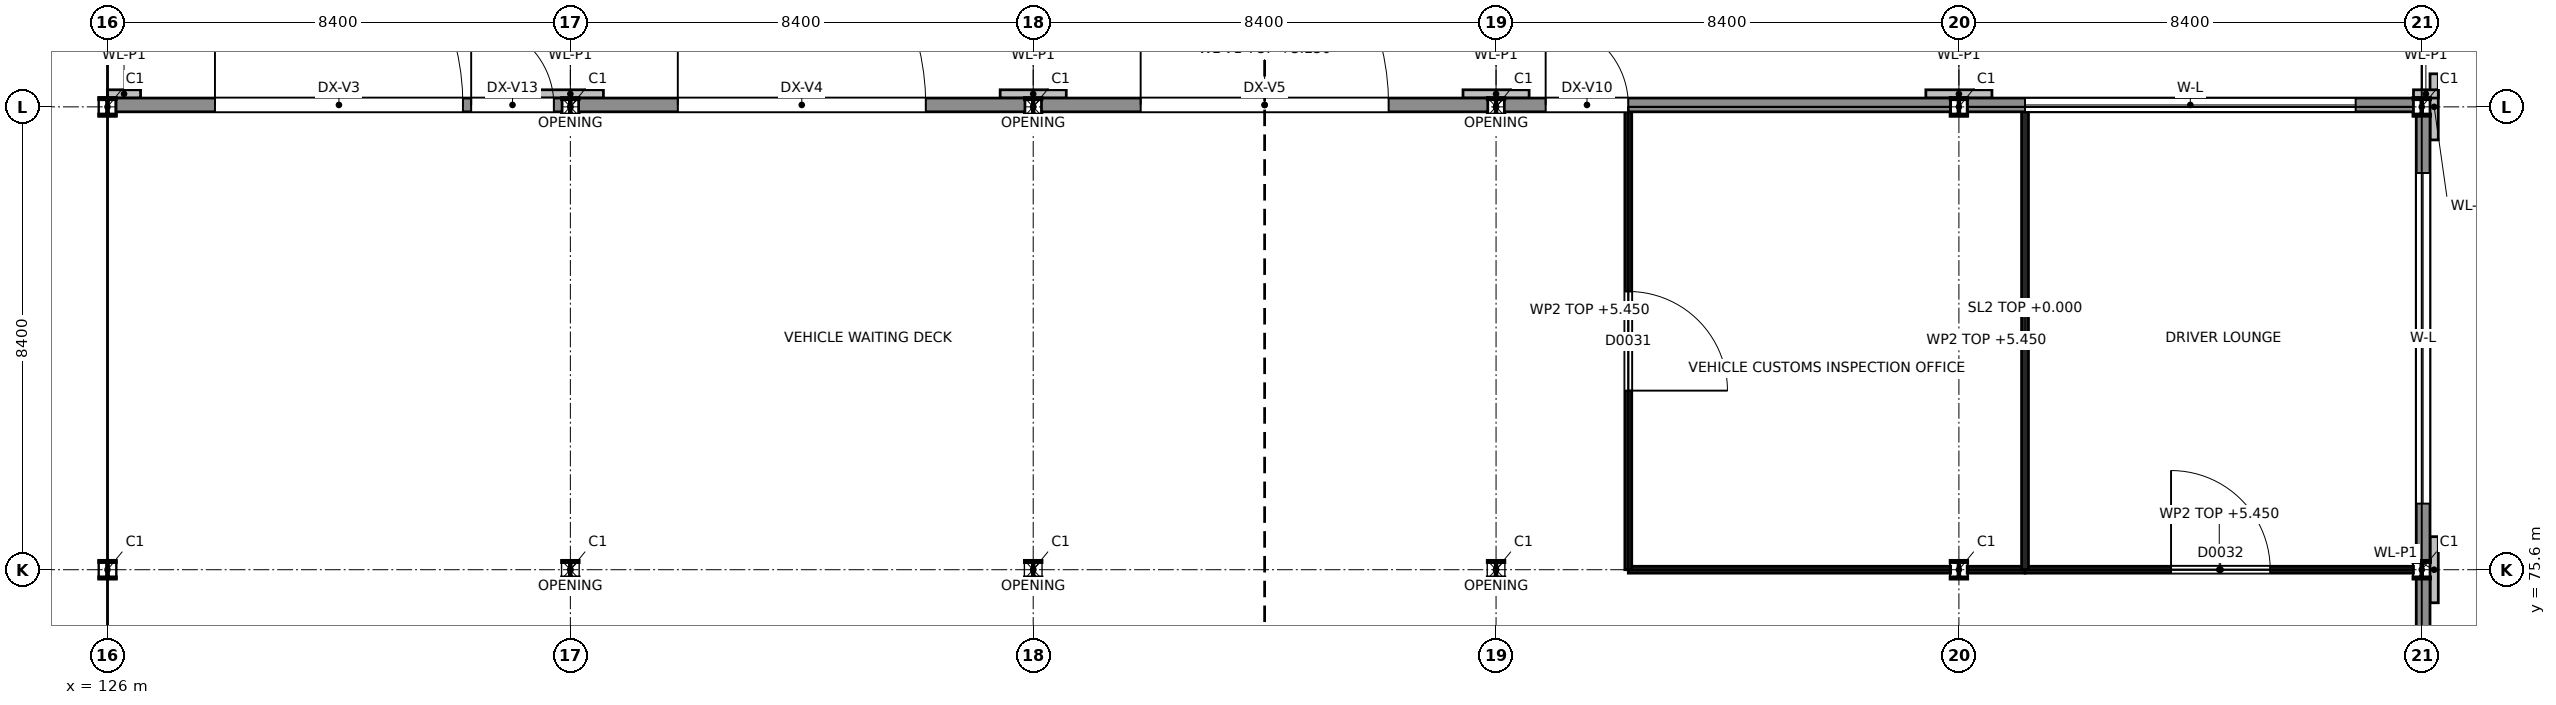
"""IFC4 building model, lengths in metres.
Left out: names, types, materials, properties, quantities, classifications, styles, units other than length and angle.
Written with IfcOpenShell. Run it as: python <this file> out.ifc"""

import sys

from ifc_helpers import new_model, si_unit, direction, frame, frame_2d, origin, origin_2d, place, context, subcontext, project, spatial, rectangle, i_section, extrude, element, fill, save


model = new_model("IFC4")
c1 = context("Model", 3, precision=1e-05, world=origin(), true_north=direction((0.0, 1.0)))
c2 = subcontext(c1, "Body", "Model", "MODEL_VIEW")
j1 = project(units=[si_unit("LENGTHUNIT", "METRE"), si_unit("PLANEANGLEUNIT", "RADIAN")], contexts=[c1])
p1 = place(None, origin())
s1 = spatial("IfcSite", under=j1, at=p1, CompositionType="ELEMENT")
p2 = place(p1, origin())
s2 = spatial("IfcBuilding", under=s1, at=p2, CompositionType="ELEMENT")
p3 = place(p2, origin())
s3 = spatial("IfcBuildingStorey", under=s2, at=p3, CompositionType="ELEMENT", Elevation=0.0)
for number, where, z_axis, x_axis in (
    (1, (126.0, 75.6, -1.35), (0.0, 0.0, 1.0), (1.0, 0.0, 0.0)),
    (2, (126.0, 84.0, -1.35), (0.0, 0.0, 1.0), (1.0, 0.0, 0.0)),
    (3, (134.4, 75.6, -1.35), (0.0, 0.0, 1.0), (1.0, 0.0, 0.0)),
    (4, (134.4, 84.0, -1.35), (0.0, 0.0, 1.0), (1.0, 0.0, 0.0)),
    (5, (142.8, 75.6, -1.35), (0.0, 0.0, 1.0), (1.0, 0.0, 0.0)),
    (6, (142.8, 84.0, -1.35), (0.0, 0.0, 1.0), (1.0, 0.0, 0.0)),
    (7, (151.2, 75.6, -1.35), (0.0, 0.0, 1.0), (1.0, 0.0, 0.0)),
    (8, (151.2, 84.0, -1.35), (0.0, 0.0, 1.0), (1.0, 0.0, 0.0)),
    (9, (159.6, 75.6, -1.35), (0.0, 0.0, 1.0), (1.0, 0.0, 0.0)),
    (10, (159.6, 84.0, -1.35), (0.0, 0.0, 1.0), (1.0, 0.0, 0.0)),
    (11, (168.0, 75.6, -1.35), (0.0, 0.0, 1.0), (1.0, 0.0, 0.0)),
    (12, (168.0, 84.0, -1.35), (0.0, 0.0, 1.0), (1.0, 0.0, 0.0)),
):
    element("IfcColumn", number, at=place(p3, frame(where, z_axis=z_axis, x_axis=x_axis)), inside=s3, PredefinedType="COLUMN", context=c2, shape_type="SweptSolid", body=[
        extrude(i_section(OverallWidth=0.3, OverallDepth=0.32, WebThickness=0.011, FlangeThickness=0.021, at=origin_2d()), origin(), (0.0, 0.0, 1.0), 7.35),
    ])
p4 = place(p3, frame((126.15, 84.035, 0.0), z_axis=(0.0, 0.0, 1.0), x_axis=(1.0, 0.0, 0.0)))
e13 = element("IfcWall", 13, at=p4, inside=s3, PredefinedType="SOLIDWALL", context=c2, shape_type="SweptSolid", body=[
    extrude(rectangle(XDim=8.1, YDim=0.25, at=frame_2d((4.05, 0.0))), origin(), (0.0, 0.0, 1.0), 5.25),
])
p5 = place(p4, frame((1.8, 0.0, 0.0)))
e14 = element("IfcOpeningElement", 14, at=p5, cuts=e13, PredefinedType="OPENING", context=c2, shape_type="SweptSolid", body=[
    extrude(rectangle(XDim=4.5, YDim=4.5, at=frame_2d((2.25, 2.25))), frame((0.0, 0.125, 0.0), z_axis=(0.0, -1.0, 0.0), x_axis=(1.0, 0.0, 0.0)), (0.0, 0.0, 1.0), 0.25),
])
p6 = place(p4, frame((6.45, 0.0, 0.0)))
e15 = element("IfcOpeningElement", 15, at=p6, cuts=e13, PredefinedType="OPENING", context=c2, shape_type="SweptSolid", body=[
    extrude(rectangle(XDim=1.5, YDim=2.4, at=frame_2d((0.75, 1.2))), frame((0.0, 0.125, 0.0), z_axis=(0.0, -1.0, 0.0), x_axis=(1.0, 0.0, 0.0)), (0.0, 0.0, 1.0), 0.25),
])
p7 = place(p3, frame((134.55, 84.035, 0.0), z_axis=(0.0, 0.0, 1.0), x_axis=(1.0, 0.0, 0.0)))
e16 = element("IfcWall", 16, at=p7, inside=s3, PredefinedType="SOLIDWALL", context=c2, shape_type="SweptSolid", body=[
    extrude(rectangle(XDim=8.1, YDim=0.25, at=frame_2d((4.05, 0.0))), origin(), (0.0, 0.0, 1.0), 5.25),
])
p8 = place(p7, frame((1.8, 0.0, 0.0)))
e17 = element("IfcOpeningElement", 17, at=p8, cuts=e16, PredefinedType="OPENING", context=c2, shape_type="SweptSolid", body=[
    extrude(rectangle(XDim=4.5, YDim=4.5, at=frame_2d((2.25, 2.25))), frame((0.0, 0.125, 0.0), z_axis=(0.0, -1.0, 0.0), x_axis=(1.0, 0.0, 0.0)), (0.0, 0.0, 1.0), 0.25),
])
p9 = place(p3, frame((142.95, 84.035, 0.0), z_axis=(0.0, 0.0, 1.0), x_axis=(1.0, 0.0, 0.0)))
e18 = element("IfcWall", 18, at=p9, inside=s3, PredefinedType="SOLIDWALL", context=c2, shape_type="SweptSolid", body=[
    extrude(rectangle(XDim=8.1, YDim=0.25, at=frame_2d((4.05, 0.0))), origin(), (0.0, 0.0, 1.0), 5.25),
])
p10 = place(p9, frame((1.8, 0.0, 0.0)))
e19 = element("IfcOpeningElement", 19, at=p10, cuts=e18, PredefinedType="OPENING", context=c2, shape_type="SweptSolid", body=[
    extrude(rectangle(XDim=4.5, YDim=4.5, at=frame_2d((2.25, 2.25))), frame((0.0, 0.125, 0.0), z_axis=(0.0, -1.0, 0.0), x_axis=(1.0, 0.0, 0.0)), (0.0, 0.0, 1.0), 0.25),
])
p11 = place(p3, frame((151.35, 84.035, 0.0), z_axis=(0.0, 0.0, 1.0), x_axis=(1.0, 0.0, 0.0)))
e20 = element("IfcWall", 20, at=p11, inside=s3, PredefinedType="SOLIDWALL", context=c2, shape_type="SweptSolid", body=[
    extrude(rectangle(XDim=8.1, YDim=0.25, at=frame_2d((4.05, 0.0))), origin(), (0.0, 0.0, 1.0), 5.25),
])
p12 = place(p11, frame((0.75, 0.0, 0.0)))
e21 = element("IfcOpeningElement", 21, at=p12, cuts=e20, PredefinedType="OPENING", context=c2, shape_type="SweptSolid", body=[
    extrude(rectangle(XDim=1.5, YDim=2.4, at=frame_2d((0.75, 1.2))), frame((0.0, 0.125, 0.0), z_axis=(0.0, -1.0, 0.0), x_axis=(1.0, 0.0, 0.0)), (0.0, 0.0, 1.0), 0.25),
])
p13 = place(p3, frame((159.75, 84.035, 0.0), z_axis=(0.0, 0.0, 1.0), x_axis=(1.0, 0.0, 0.0)))
e22 = element("IfcWall", 22, at=p13, inside=s3, PredefinedType="SOLIDWALL", context=c2, shape_type="SweptSolid", body=[
    extrude(rectangle(XDim=8.1, YDim=0.25, at=frame_2d((4.05, 0.0))), origin(), (0.0, 0.0, 1.0), 5.25),
])
p14 = place(p13, frame((1.05, 0.0, 1.2)))
e23 = element("IfcOpeningElement", 23, at=p14, cuts=e22, PredefinedType="OPENING", context=c2, shape_type="SweptSolid", body=[
    extrude(rectangle(XDim=6.0, YDim=3.0, at=frame_2d((3.0, 1.5))), frame((0.0, 0.125, 0.0), z_axis=(0.0, -1.0, 0.0), x_axis=(1.0, 0.0, 0.0)), (0.0, 0.0, 1.0), 0.25),
])
p15 = place(p3, frame((126.0, 84.235, 0.0), z_axis=(0.0, 0.0, 1.0), x_axis=(1.0, 0.0, 0.0)))
e24 = element("IfcWall", 24, at=p15, inside=s3, PredefinedType="SOLIDWALL", context=c2, shape_type="SweptSolid", body=[
    extrude(rectangle(XDim=0.6, YDim=0.15, at=frame_2d((0.3, 0.0))), origin(), (0.0, 0.0, 1.0), 6.0),
])
for number, where, z_axis, x_axis in (
    (25, (133.8, 84.235, 0.0), (0.0, 0.0, 1.0), (1.0, 0.0, 0.0)),
    (26, (142.2, 84.235, 0.0), (0.0, 0.0, 1.0), (1.0, 0.0, 0.0)),
    (27, (150.6, 84.235, 0.0), (0.0, 0.0, 1.0), (1.0, 0.0, 0.0)),
    (28, (159.0, 84.235, 0.0), (0.0, 0.0, 1.0), (1.0, 0.0, 0.0)),
):
    element("IfcWall", number, at=place(p3, frame(where, z_axis=z_axis, x_axis=x_axis)), inside=s3, PredefinedType="SOLIDWALL", context=c2, shape_type="SweptSolid", body=[
        extrude(rectangle(XDim=1.2, YDim=0.15, at=frame_2d((0.6, 0.0))), origin(), (0.0, 0.0, 1.0), 6.0),
    ])
p16 = place(p3, frame((167.85, 84.235, 0.0), z_axis=(0.0, 0.0, 1.0), x_axis=(1.0, 0.0, 0.0)))
e29 = element("IfcWall", 29, at=p16, inside=s3, PredefinedType="SOLIDWALL", context=c2, shape_type="SweptSolid", body=[
    extrude(rectangle(XDim=0.45, YDim=0.15, at=frame_2d((0.225, 0.0))), origin(), (0.0, 0.0, 1.0), 6.0),
])
p17 = place(p3, frame((168.025, 67.36, 0.0), z_axis=(0.0, 0.0, 1.0), x_axis=(0.0, 1.0, 0.0)))
e30 = element("IfcWall", 30, at=p17, inside=s3, PredefinedType="SOLIDWALL", context=c2, shape_type="SweptSolid", body=[
    extrude(rectangle(XDim=8.08, YDim=0.25, at=frame_2d((4.04, 0.0))), origin(), (0.0, 0.0, 1.0), 5.25),
])
p18 = place(p17, frame((1.04, 0.0, 1.2)))
e31 = element("IfcOpeningElement", 31, at=p18, cuts=e30, PredefinedType="OPENING", context=c2, shape_type="SweptSolid", body=[
    extrude(rectangle(XDim=6.0, YDim=3.0, at=frame_2d((3.0, 1.5))), frame((0.0, 0.125, 0.0), z_axis=(0.0, -1.0, 0.0), x_axis=(1.0, 0.0, 0.0)), (0.0, 0.0, 1.0), 0.25),
])
p19 = place(p3, frame((168.025, 75.76, 0.0), z_axis=(0.0, 0.0, 1.0), x_axis=(0.0, 1.0, 0.0)))
e32 = element("IfcWall", 32, at=p19, inside=s3, PredefinedType="SOLIDWALL", context=c2, shape_type="SweptSolid", body=[
    extrude(rectangle(XDim=8.08, YDim=0.25, at=frame_2d((4.04, 0.0))), origin(), (0.0, 0.0, 1.0), 5.25),
])
p20 = place(p19, frame((1.04, 0.0, 1.2)))
e33 = element("IfcOpeningElement", 33, at=p20, cuts=e32, PredefinedType="OPENING", context=c2, shape_type="SweptSolid", body=[
    extrude(rectangle(XDim=6.0, YDim=3.0, at=frame_2d((3.0, 1.5))), frame((0.0, 0.125, 0.0), z_axis=(0.0, -1.0, 0.0), x_axis=(1.0, 0.0, 0.0)), (0.0, 0.0, 1.0), 0.25),
])
p21 = place(p3, frame((168.225, 75.0, 0.0), z_axis=(0.0, 0.0, 1.0), x_axis=(0.0, 1.0, 0.0)))
e34 = element("IfcWall", 34, at=p21, inside=s3, PredefinedType="SOLIDWALL", context=c2, shape_type="SweptSolid", body=[
    extrude(rectangle(XDim=1.2, YDim=0.15, at=frame_2d((0.6, 0.0))), origin(), (0.0, 0.0, 1.0), 6.0),
])
p22 = place(p3, frame((168.225, 83.4, 0.0), z_axis=(0.0, 0.0, 1.0), x_axis=(0.0, 1.0, 0.0)))
e35 = element("IfcWall", 35, at=p22, inside=s3, PredefinedType="SOLIDWALL", context=c2, shape_type="SweptSolid", body=[
    extrude(rectangle(XDim=1.2, YDim=0.15, at=frame_2d((0.6, 0.0))), origin(), (0.0, 0.0, 1.0), 6.0),
])
p23 = place(p3, frame((153.6, 75.6, 0.0), z_axis=(0.0, 0.0, 1.0), x_axis=(1.0, 0.0, 0.0)))
e36 = element("IfcWall", 36, at=p23, inside=s3, PredefinedType="PARTITIONING", context=c2, shape_type="SweptSolid", body=[
    extrude(rectangle(XDim=5.85, YDim=0.125, at=frame_2d((2.925, 0.0))), origin(), (0.0, 0.0, 1.0), 5.45),
])
p24 = place(p3, frame((159.75, 75.6, 0.0), z_axis=(0.0, 0.0, 1.0), x_axis=(1.0, 0.0, 0.0)))
e37 = element("IfcWall", 37, at=p24, inside=s3, PredefinedType="PARTITIONING", context=c2, shape_type="SweptSolid", body=[
    extrude(rectangle(XDim=1.05, YDim=0.125, at=frame_2d((0.525, 0.0))), origin(), (0.0, 0.0, 1.0), 5.45),
])
p25 = place(p3, frame((153.6, 75.6, 0.0), z_axis=(0.0, 0.0, 1.0), x_axis=(0.0, 1.0, 0.0)))
e38 = element("IfcWall", 38, at=p25, inside=s3, PredefinedType="PARTITIONING", context=c2, shape_type="SweptSolid", body=[
    extrude(rectangle(XDim=8.309, YDim=0.125, at=frame_2d((4.155, 0.0))), origin(), (0.0, 0.0, 1.0), 5.45),
])
p26 = place(p25, frame((3.25, 0.0, 0.0)))
e39 = element("IfcOpeningElement", 39, at=p26, cuts=e38, PredefinedType="OPENING", context=c2, shape_type="SweptSolid", body=[
    extrude(rectangle(XDim=1.8, YDim=2.1, at=frame_2d((0.9, 1.05))), frame((0.0, 0.062, 0.0), z_axis=(0.0, -1.0, 0.0), x_axis=(1.0, 0.0, 0.0)), (0.0, 0.0, 1.0), 0.125),
])
p27 = place(p3, frame((160.8, 75.6, 0.0), z_axis=(0.0, 0.0, 1.0), x_axis=(1.0, 0.0, 0.0)))
e40 = element("IfcWall", 40, at=p27, inside=s3, PredefinedType="PARTITIONING", context=c2, shape_type="SweptSolid", body=[
    extrude(rectangle(XDim=7.05, YDim=0.125, at=frame_2d((3.525, 0.0))), origin(), (0.0, 0.0, 1.0), 5.45),
])
p28 = place(p27, frame((2.65, 0.0, 0.0)))
e41 = element("IfcOpeningElement", 41, at=p28, cuts=e40, PredefinedType="OPENING", context=c2, shape_type="SweptSolid", body=[
    extrude(rectangle(XDim=1.8, YDim=2.1, at=frame_2d((0.9, 1.05))), frame((0.0, 0.062, 0.0), z_axis=(0.0, -1.0, 0.0), x_axis=(1.0, 0.0, 0.0)), (0.0, 0.0, 1.0), 0.125),
])
p29 = place(p3, frame((160.8, 75.6, 0.0), z_axis=(0.0, 0.0, 1.0), x_axis=(0.0, 1.0, 0.0)))
e42 = element("IfcWall", 42, at=p29, inside=s3, PredefinedType="PARTITIONING", context=c2, shape_type="SweptSolid", body=[
    extrude(rectangle(XDim=8.309, YDim=0.125, at=frame_2d((4.155, 0.0))), origin(), (0.0, 0.0, 1.0), 5.45),
])
p30 = place(p5, origin())
e43 = element("IfcDoor", 43, at=p30, inside=s3, OperationType="ROLLINGUP", PredefinedType="GATE", context=c2, shape_type="SweptSolid", body=[
    extrude(rectangle(XDim=4.5, YDim=4.5, at=frame_2d((2.25, 2.25))), frame((0.0, 0.025, 0.0), z_axis=(0.0, -1.0, 0.0), x_axis=(1.0, 0.0, 0.0)), (0.0, 0.0, 1.0), 0.05),
])
fill(e14, e43)
p31 = place(p6, origin())
e44 = element("IfcDoor", 44, at=p31, inside=s3, OperationType="DOUBLE_DOOR_SINGLE_SWING", PredefinedType="DOOR", context=c2, shape_type="SweptSolid", body=[
    extrude(rectangle(XDim=1.5, YDim=2.4, at=frame_2d((0.75, 1.2))), frame((0.0, 0.025, 0.0), z_axis=(0.0, -1.0, 0.0), x_axis=(1.0, 0.0, 0.0)), (0.0, 0.0, 1.0), 0.05),
])
fill(e15, e44)
p32 = place(p8, origin())
e45 = element("IfcDoor", 45, at=p32, inside=s3, OperationType="ROLLINGUP", PredefinedType="GATE", context=c2, shape_type="SweptSolid", body=[
    extrude(rectangle(XDim=4.5, YDim=4.5, at=frame_2d((2.25, 2.25))), frame((0.0, 0.025, 0.0), z_axis=(0.0, -1.0, 0.0), x_axis=(1.0, 0.0, 0.0)), (0.0, 0.0, 1.0), 0.05),
])
fill(e17, e45)
p33 = place(p10, origin())
e46 = element("IfcDoor", 46, at=p33, inside=s3, OperationType="ROLLINGUP", PredefinedType="GATE", context=c2, shape_type="SweptSolid", body=[
    extrude(rectangle(XDim=4.5, YDim=4.5, at=frame_2d((2.25, 2.25))), frame((0.0, 0.025, 0.0), z_axis=(0.0, -1.0, 0.0), x_axis=(1.0, 0.0, 0.0)), (0.0, 0.0, 1.0), 0.05),
])
fill(e19, e46)
p34 = place(p12, origin())
e47 = element("IfcDoor", 47, at=p34, inside=s3, OperationType="DOUBLE_DOOR_SINGLE_SWING", PredefinedType="DOOR", context=c2, shape_type="SweptSolid", body=[
    extrude(rectangle(XDim=1.5, YDim=2.4, at=frame_2d((0.75, 1.2))), frame((0.0, 0.025, 0.0), z_axis=(0.0, -1.0, 0.0), x_axis=(1.0, 0.0, 0.0)), (0.0, 0.0, 1.0), 0.05),
])
fill(e21, e47)
p35 = place(p14, origin())
e48 = element("IfcWindow", 48, at=p35, inside=s3, PartitioningType="SINGLE_PANEL", PredefinedType="WINDOW", context=c2, shape_type="SweptSolid", body=[
    extrude(rectangle(XDim=6.0, YDim=3.0, at=frame_2d((3.0, 1.5))), frame((0.0, 0.03, 0.0), z_axis=(0.0, -1.0, 0.0), x_axis=(1.0, 0.0, 0.0)), (0.0, 0.0, 1.0), 0.06),
])
fill(e23, e48)
p36 = place(p20, origin())
e49 = element("IfcWindow", 49, at=p36, inside=s3, PartitioningType="SINGLE_PANEL", PredefinedType="WINDOW", context=c2, shape_type="SweptSolid", body=[
    extrude(rectangle(XDim=6.0, YDim=3.0, at=frame_2d((3.0, 1.5))), frame((0.0, 0.03, 0.0), z_axis=(0.0, -1.0, 0.0), x_axis=(1.0, 0.0, 0.0)), (0.0, 0.0, 1.0), 0.06),
])
fill(e33, e49)
p37 = place(p26, origin())
e50 = element("IfcDoor", 50, at=p37, inside=s3, OperationType="DOUBLE_DOOR_DOUBLE_SWING", PredefinedType="DOOR", context=c2, shape_type="SweptSolid", body=[
    extrude(rectangle(XDim=1.8, YDim=2.1, at=frame_2d((0.9, 1.05))), frame((0.0, 0.025, 0.0), z_axis=(0.0, -1.0, 0.0), x_axis=(1.0, 0.0, 0.0)), (0.0, 0.0, 1.0), 0.05),
])
fill(e39, e50)
p38 = place(p28, origin())
e51 = element("IfcDoor", 51, at=p38, inside=s3, OperationType="DOUBLE_DOOR_DOUBLE_SWING", PredefinedType="DOOR", context=c2, shape_type="SweptSolid", body=[
    extrude(rectangle(XDim=1.8, YDim=2.1, at=frame_2d((0.9, 1.05))), frame((0.0, 0.025, 0.0), z_axis=(0.0, -1.0, 0.0), x_axis=(1.0, 0.0, 0.0)), (0.0, 0.0, 1.0), 0.05),
])
fill(e41, e51)
save(model, sys.argv[1])
